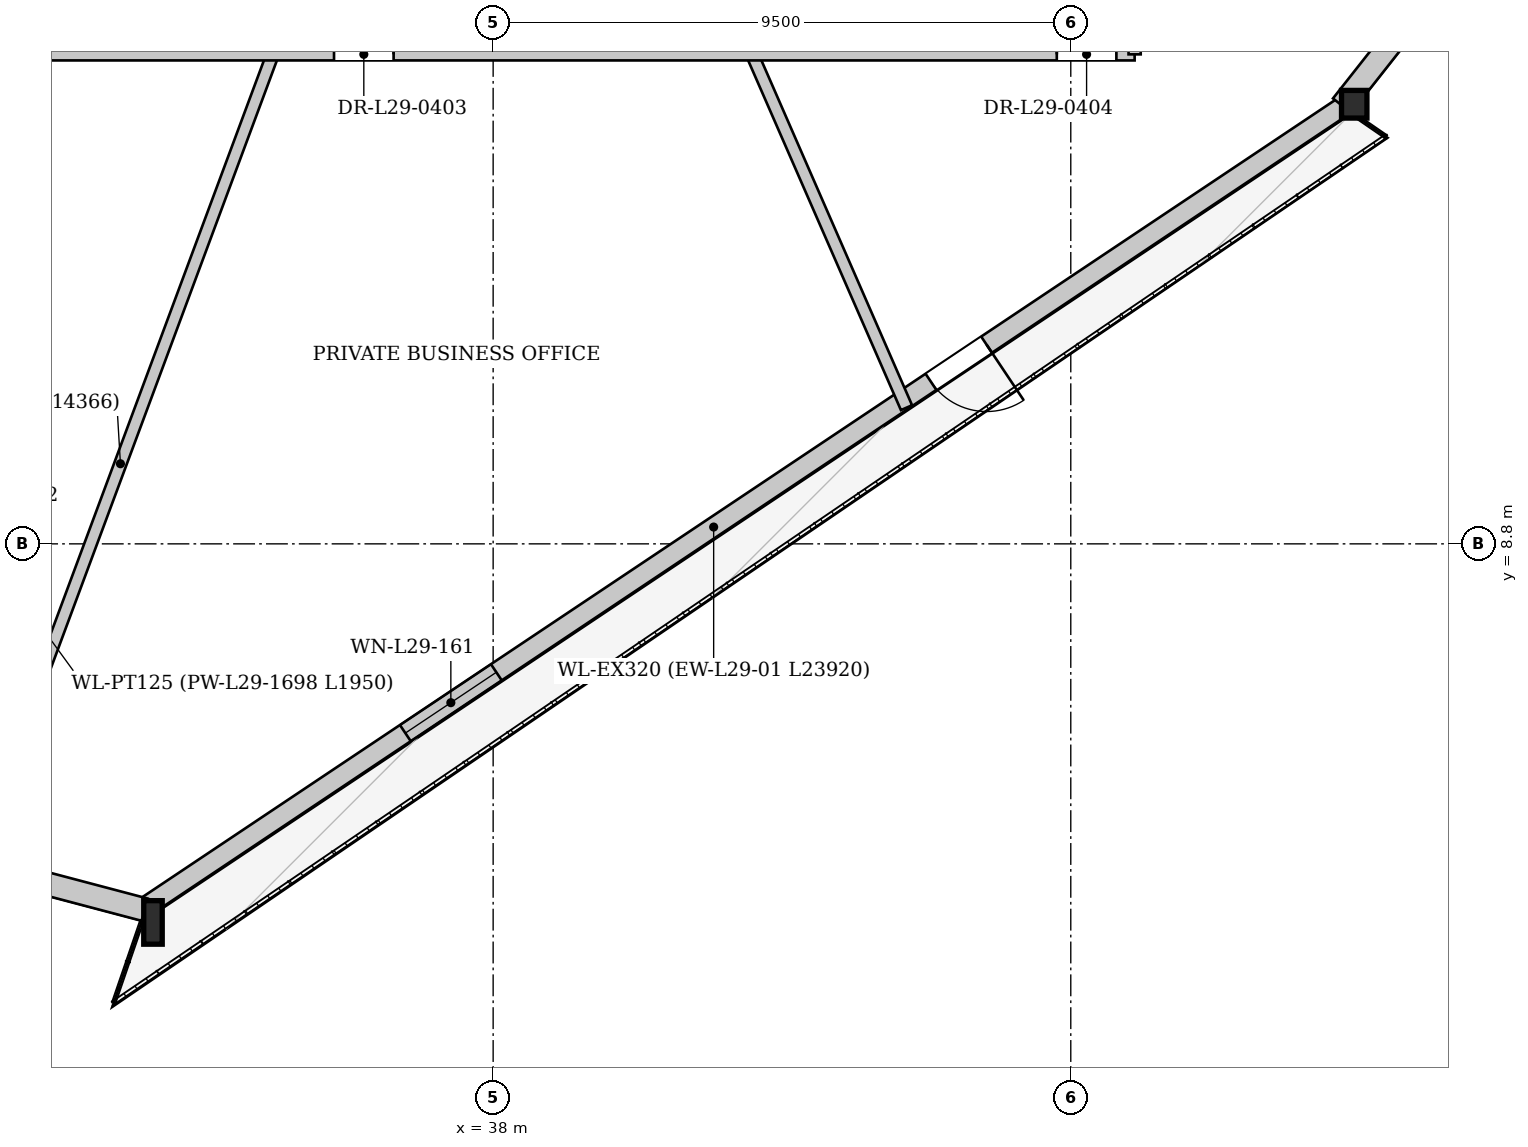
"""IFC4 building model, lengths in metres.
Left out: names, types, materials, properties, quantities, classifications, styles, units other than length and angle.
Written with IfcOpenShell. Run it as: python <this file> out.ifc"""

import sys

from ifc_helpers import new_model, si_unit, direction, frame, frame_2d, origin, origin_2d, place, context, subcontext, project, spatial, rectangle, i_section, extrude, source, transform, mapped, element, fill, save


model = new_model("IFC4")
c1 = context("Model", 3, precision=1e-05, world=origin(), true_north=direction((0.0, 1.0)))
c2 = subcontext(c1, "Body", "Model", "MODEL_VIEW")
j1 = project(units=[si_unit("LENGTHUNIT", "METRE"), si_unit("PLANEANGLEUNIT", "RADIAN")], contexts=[c1])
p1 = place(None, origin())
s1 = spatial("IfcSite", under=j1, at=p1, CompositionType="ELEMENT")
p2 = place(p1, origin())
s2 = spatial("IfcBuilding", under=s1, at=p2, CompositionType="ELEMENT")
p3 = place(p2, frame((0.0, 0.0, 112.8)))
s3 = spatial("IfcBuildingStorey", under=s2, at=p3, CompositionType="ELEMENT", Elevation=112.8)
m1 = source(origin(), c2, "Body", "SweptSolid", [
    extrude(i_section(OverallWidth=0.304, OverallDepth=0.716, WebThickness=0.021, FlangeThickness=0.04, at=origin_2d()), origin(), (0.0, 0.0, 1.0), 3.405),
])
p4 = place(p3, frame((32.222, 2.6, 0.0), z_axis=(0.107475750948, -0.014841547996, 0.994096922544), x_axis=(0.136793930518, 0.990599525829, 0.0)))
e1 = element("IfcColumn", 1, at=p4, inside=s3, PredefinedType="COLUMN", context=c2, shape_type="MappedRepresentation", body=[
    mapped(m1, transform((0.0, 0.0, 0.0), x_axis=(1.0, 0.0, 0.0), y_axis=(0.0, 1.0, 0.0), z_axis=(0.0, 0.0, 1.0), scale=1.0)),
])
m2 = source(origin(), c2, "Body", "SweptSolid", [
    extrude(i_section(OverallWidth=0.418, OverallDepth=0.455, WebThickness=0.038, FlangeThickness=0.059, at=origin_2d()), origin(), (0.0, 0.0, 1.0), 3.398),
])
p5 = place(p3, frame((52.111, 15.89, 0.0), z_axis=(0.029960418259, 0.082193569518, 0.996165945246), x_axis=(-0.939529379003, 0.34246831385, 0.0)))
e2 = element("IfcColumn", 2, at=p5, inside=s3, PredefinedType="COLUMN", context=c2, shape_type="MappedRepresentation", body=[
    mapped(m2, transform((0.0, 0.0, 0.0), x_axis=(1.0, 0.0, 0.0), y_axis=(0.0, 1.0, 0.0), z_axis=(0.0, 0.0, 1.0), scale=1.0)),
])
p6 = place(p3, frame((52.022, 16.023, 0.0), z_axis=(0.0, 0.0, 1.0), x_axis=(-0.831442115586, -0.55561138256, 0.0)))
e3 = element("IfcWall", 3, at=p6, inside=s3, PredefinedType="SOLIDWALL", context=c2, shape_type="SweptSolid", body=[
    extrude(rectangle(XDim=23.92, YDim=0.32, at=frame_2d((11.96, 0.0))), origin(), (0.0, 0.0, 1.0), 2.692),
])
p7 = place(p6, frame((7.104, 0.0, 0.0)))
e4 = element("IfcOpeningElement", 4, at=p7, cuts=e3, PredefinedType="OPENING", context=c2, shape_type="SweptSolid", body=[
    extrude(rectangle(XDim=1.1, YDim=2.3, at=frame_2d((0.55, 1.15))), frame((0.0, 0.17, 0.0), z_axis=(0.0, -1.0, 0.0), x_axis=(1.0, 0.0, 0.0)), (0.0, 0.0, 1.0), 0.34),
])
p8 = place(p6, frame((16.801, 0.0, 0.372)))
e5 = element("IfcOpeningElement", 5, at=p8, cuts=e3, PredefinedType="OPENING", context=c2, shape_type="SweptSolid", body=[
    extrude(rectangle(XDim=1.8, YDim=2.2, at=frame_2d((0.9, 1.1))), frame((0.0, 0.17, 0.0), z_axis=(0.0, -1.0, 0.0), x_axis=(1.0, 0.0, 0.0)), (0.0, 0.0, 1.0), 0.34),
])
p9 = place(p3, frame((32.271, 2.783, 0.0), z_axis=(0.0, 0.0, 1.0), x_axis=(-0.966828311794, 0.255427123686, 0.0)))
e6 = element("IfcWall", 6, at=p9, inside=s3, PredefinedType="SOLIDWALL", context=c2, shape_type="SweptSolid", body=[
    extrude(rectangle(XDim=5.263, YDim=0.38, at=frame_2d((2.631, 0.0))), origin(), (0.0, 0.0, 1.0), 2.692),
])
p10 = place(p3, frame((66.771, 34.791, 0.0), z_axis=(0.0, 0.0, 1.0), x_axis=(-0.619144125254, -0.785277372757, 0.0)))
e7 = element("IfcWall", 7, at=p10, inside=s3, PredefinedType="SOLIDWALL", context=c2, shape_type="SweptSolid", body=[
    extrude(rectangle(XDim=23.92, YDim=0.38, at=frame_2d((11.96, 0.0))), origin(), (0.0, 0.0, 1.0), 2.692),
])
p11 = place(p10, frame((5.598, 0.0, 0.322)))
e8 = element("IfcOpeningElement", 8, at=p11, cuts=e7, PredefinedType="OPENING", context=c2, shape_type="SweptSolid", body=[
    extrude(rectangle(XDim=2.2, YDim=2.25, at=frame_2d((1.1, 1.125))), frame((0.0, 0.2, 0.0), z_axis=(0.0, -1.0, 0.0), x_axis=(1.0, 0.0, 0.0)), (0.0, 0.0, 1.0), 0.4),
])
p12 = place(p10, frame((16.122, 0.0, 0.322)))
e9 = element("IfcOpeningElement", 9, at=p12, cuts=e7, PredefinedType="OPENING", context=c2, shape_type="SweptSolid", body=[
    extrude(rectangle(XDim=2.2, YDim=2.25, at=frame_2d((1.1, 1.125))), frame((0.0, 0.2, 0.0), z_axis=(0.0, -1.0, 0.0), x_axis=(1.0, 0.0, 0.0)), (0.0, 0.0, 1.0), 0.4),
])
p13 = place(p3, frame((34.374, 16.85, 0.0), z_axis=(0.0, 0.0, 1.0), x_axis=(-0.348574362272, -0.937281128566, 0.0)))
e10 = element("IfcWall", 10, at=p13, inside=s3, PredefinedType="PARTITIONING", context=c2, shape_type="SweptSolid", body=[
    extrude(rectangle(XDim=14.366, YDim=0.2, at=frame_2d((7.183, 0.0))), origin(), (0.0, 0.0, 1.0), 3.3),
])
p14 = place(p3, frame((42.26, 16.85, 0.0), z_axis=(0.0, 0.0, 1.0), x_axis=(0.400317853683, -0.916376350646, 0.0)))
e11 = element("IfcWall", 11, at=p14, inside=s3, PredefinedType="PARTITIONING", context=c2, shape_type="SweptSolid", body=[
    extrude(rectangle(XDim=6.341, YDim=0.2, at=frame_2d((3.17, 0.0))), origin(), (0.0, 0.0, 1.0), 3.3),
])
p15 = place(p3, frame((27.45, 16.85, 0.0), z_axis=(0.0, 0.0, 1.0), x_axis=(1.0, 0.0, 0.0)))
e12 = element("IfcWall", 12, at=p15, inside=s3, PredefinedType="PARTITIONING", context=c2, shape_type="SweptSolid", body=[
    extrude(rectangle(XDim=21.1, YDim=0.2, at=frame_2d((10.55, 0.0))), origin(), (0.0, 0.0, 1.0), 2.985),
])
p16 = place(p15, frame((7.933, 0.0, 0.0)))
e13 = element("IfcOpeningElement", 13, at=p16, cuts=e12, PredefinedType="OPENING", context=c2, shape_type="SweptSolid", body=[
    extrude(rectangle(XDim=0.98, YDim=2.15, at=frame_2d((0.49, 1.075))), frame((0.0, 0.11, 0.0), z_axis=(0.0, -1.0, 0.0), x_axis=(1.0, 0.0, 0.0)), (0.0, 0.0, 1.0), 0.22),
])
p17 = place(p15, frame((19.82, 0.0, 0.0)))
e14 = element("IfcOpeningElement", 14, at=p17, cuts=e12, PredefinedType="OPENING", context=c2, shape_type="SweptSolid", body=[
    extrude(rectangle(XDim=0.98, YDim=2.15, at=frame_2d((0.49, 1.075))), frame((0.0, 0.11, 0.0), z_axis=(0.0, -1.0, 0.0), x_axis=(1.0, 0.0, 0.0)), (0.0, 0.0, 1.0), 0.22),
])
p18 = place(p15, frame((0.3, 0.0, 0.0)))
e15 = element("IfcOpeningElement", 15, at=p18, cuts=e12, PredefinedType="OPENING", context=c2, shape_type="SweptSolid", body=[
    extrude(rectangle(XDim=0.98, YDim=2.15, at=frame_2d((0.49, 1.075))), frame((0.0, 0.11, 0.0), z_axis=(0.0, -1.0, 0.0), x_axis=(1.0, 0.0, 0.0)), (0.0, 0.0, 1.0), 0.22),
])
p19 = place(p3, frame((48.55, 16.85, 0.0), z_axis=(0.0, 0.0, 1.0), x_axis=(0.0, 1.0, 0.0)))
e16 = element("IfcWall", 16, at=p19, inside=s3, PredefinedType="PARTITIONING", context=c2, shape_type="SweptSolid", body=[
    extrude(rectangle(XDim=19.5, YDim=0.2, at=frame_2d((9.75, 0.0))), origin(), (0.0, 0.0, 1.0), 3.3),
])
p20 = place(p19, frame((9.174, 0.0, 0.0)))
e17 = element("IfcOpeningElement", 17, at=p20, cuts=e16, PredefinedType="OPENING", context=c2, shape_type="SweptSolid", body=[
    extrude(rectangle(XDim=0.98, YDim=2.15, at=frame_2d((0.49, 1.075))), frame((0.0, 0.11, 0.0), z_axis=(0.0, -1.0, 0.0), x_axis=(1.0, 0.0, 0.0)), (0.0, 0.0, 1.0), 0.22),
])
m3 = source(origin(), c2, "Body", "SweptSolid", [
    extrude(rectangle(XDim=1.1, YDim=2.3, at=frame_2d((0.55, 1.15))), frame((0.0, 0.025, 0.0), z_axis=(0.0, -1.0, 0.0), x_axis=(1.0, 0.0, 0.0)), (0.0, 0.0, 1.0), 0.05),
])
p21 = place(p7, origin())
e18 = element("IfcDoor", 18, at=p21, inside=s3, OperationType="SINGLE_SWING_LEFT", PredefinedType="DOOR", context=c2, shape_type="MappedRepresentation", body=[
    mapped(m3, transform((0.0, 0.0, 0.0), x_axis=(1.0, 0.0, 0.0), y_axis=(0.0, 1.0, 0.0), z_axis=(0.0, 0.0, 1.0), scale=1.0)),
])
fill(e4, e18)
m4 = source(origin(), c2, "Body", "SweptSolid", [
    extrude(rectangle(XDim=1.8, YDim=2.2, at=frame_2d((0.9, 1.1))), frame((0.0, 0.03, 0.0), z_axis=(0.0, -1.0, 0.0), x_axis=(1.0, 0.0, 0.0)), (0.0, 0.0, 1.0), 0.06),
])
p22 = place(p8, origin())
e19 = element("IfcWindow", 19, at=p22, inside=s3, PartitioningType="SINGLE_PANEL", PredefinedType="WINDOW", context=c2, shape_type="MappedRepresentation", body=[
    mapped(m4, transform((0.0, 0.0, 0.0), x_axis=(1.0, 0.0, 0.0), y_axis=(0.0, 1.0, 0.0), z_axis=(0.0, 0.0, 1.0), scale=1.0)),
])
fill(e5, e19)
m5 = source(origin(), c2, "Body", "SweptSolid", [
    extrude(rectangle(XDim=0.98, YDim=2.15, at=frame_2d((0.49, 1.075))), frame((0.0, 0.025, 0.0), z_axis=(0.0, -1.0, 0.0), x_axis=(1.0, 0.0, 0.0)), (0.0, 0.0, 1.0), 0.05),
])
p23 = place(p16, origin())
e20 = element("IfcDoor", 20, at=p23, inside=s3, OperationType="SINGLE_SWING_RIGHT", PredefinedType="DOOR", context=c2, shape_type="MappedRepresentation", body=[
    mapped(m5, transform((0.0, 0.0, 0.0), x_axis=(1.0, 0.0, 0.0), y_axis=(0.0, 1.0, 0.0), z_axis=(0.0, 0.0, 1.0), scale=1.0)),
])
fill(e13, e20)
p24 = place(p17, origin())
e21 = element("IfcDoor", 21, at=p24, inside=s3, OperationType="SINGLE_SWING_LEFT", PredefinedType="DOOR", context=c2, shape_type="MappedRepresentation", body=[
    mapped(m5, transform((0.0, 0.0, 0.0), x_axis=(1.0, 0.0, 0.0), y_axis=(0.0, 1.0, 0.0), z_axis=(0.0, 0.0, 1.0), scale=1.0)),
])
fill(e14, e21)
save(model, sys.argv[1])
